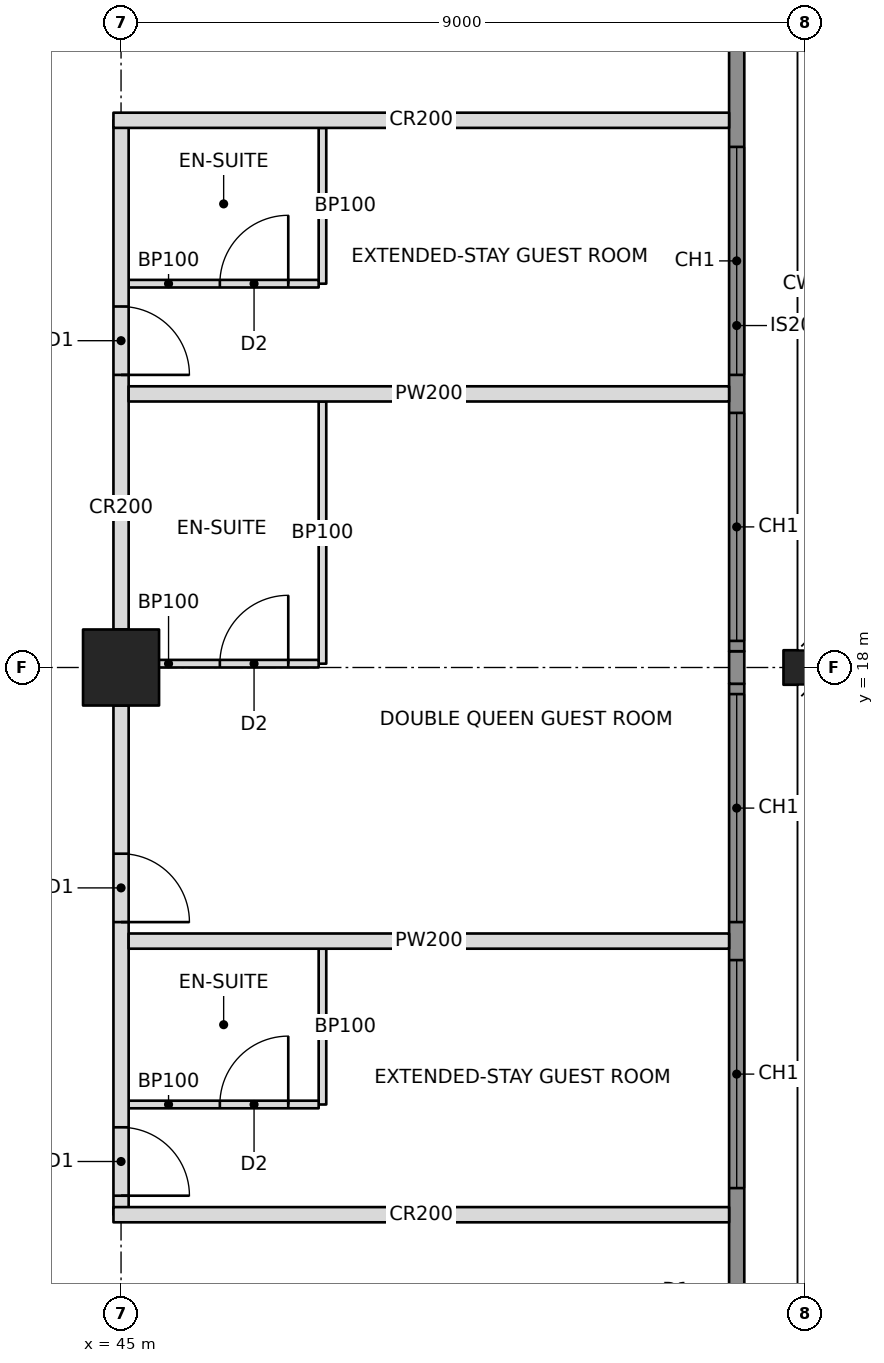
"""IFC4 building model, lengths in metres.
Left out: names, types, materials, properties, quantities, classifications, styles, units other than length and angle.
Written with IfcOpenShell. Run it as: python <this file> out.ifc"""

import sys

from ifc_helpers import new_model, si_unit, direction, frame, frame_2d, origin, origin_2d, place, context, subcontext, project, spatial, rectangle, hollow_rectangle, i_section, extrude, element, fill, save


model = new_model("IFC4")
c1 = context("Model", 3, precision=1e-05, world=origin(), true_north=direction((0.0, 1.0)))
c2 = subcontext(c1, "Body", "Model", "MODEL_VIEW")
j1 = project(units=[si_unit("LENGTHUNIT", "METRE"), si_unit("PLANEANGLEUNIT", "RADIAN")], contexts=[c1])
p1 = place(None, origin())
s1 = spatial("IfcSite", under=j1, at=p1, CompositionType="ELEMENT")
p2 = place(p1, origin())
s2 = spatial("IfcBuilding", under=s1, at=p2, CompositionType="ELEMENT")
p3 = place(p2, frame((0.0, 0.0, 85.8)))
s3 = spatial("IfcBuildingStorey", under=s2, at=p3, CompositionType="ELEMENT", Elevation=85.8)
p4 = place(p3, frame((45.0, 18.0, 0.0), z_axis=(0.0, 0.0, 1.0), x_axis=(0.0, 1.0, 0.0)))
e1 = element("IfcColumn", 1, at=p4, inside=s3, PredefinedType="COLUMN", context=c2, shape_type="SweptSolid", body=[
    extrude(hollow_rectangle(XDim=1.0, YDim=1.0, WallThickness=0.1, at=origin_2d()), origin(), (0.0, 0.0, 1.0), 3.4),
])
p5 = place(p3, frame((54.0, 18.0, 0.0), z_axis=(0.0, 0.0, 1.0), x_axis=(0.0, 1.0, 0.0)))
e2 = element("IfcColumn", 2, at=p5, inside=s3, PredefinedType="COLUMN", context=c2, shape_type="SweptSolid", body=[
    extrude(i_section(OverallWidth=0.455, OverallDepth=0.569, WebThickness=0.078, FlangeThickness=0.125, at=origin_2d()), origin(), (0.0, 0.0, 1.0), 3.4),
])
p6 = place(p3, frame((45.0, 10.8, 0.0), z_axis=(0.0, 0.0, 1.0), x_axis=(0.0, 1.0, 0.0)))
e3 = element("IfcWall", 3, at=p6, inside=s3, PredefinedType="PARTITIONING", context=c2, shape_type="SweptSolid", body=[
    extrude(rectangle(XDim=6.7, YDim=0.2, at=frame_2d((3.35, 0.0))), origin(), (0.0, 0.0, 1.0), 2.21),
])
p7 = place(p6, frame((0.25, 0.0, 0.0)))
e4 = element("IfcOpeningElement", 4, at=p7, cuts=e3, PredefinedType="OPENING", context=c2, shape_type="SweptSolid", body=[
    extrude(rectangle(XDim=0.9, YDim=2.1, at=frame_2d((0.45, 1.05))), frame((0.0, 0.11, 0.0), z_axis=(0.0, -1.0, 0.0), x_axis=(1.0, 0.0, 0.0)), (0.0, 0.0, 1.0), 0.22),
])
p8 = place(p6, frame((3.85, 0.0, 0.0)))
e5 = element("IfcOpeningElement", 5, at=p8, cuts=e3, PredefinedType="OPENING", context=c2, shape_type="SweptSolid", body=[
    extrude(rectangle(XDim=0.9, YDim=2.1, at=frame_2d((0.45, 1.05))), frame((0.0, 0.11, 0.0), z_axis=(0.0, -1.0, 0.0), x_axis=(1.0, 0.0, 0.0)), (0.0, 0.0, 1.0), 0.22),
])
p9 = place(p3, frame((45.0, 18.5, 0.0), z_axis=(0.0, 0.0, 1.0), x_axis=(0.0, 1.0, 0.0)))
e6 = element("IfcWall", 6, at=p9, inside=s3, PredefinedType="PARTITIONING", context=c2, shape_type="SweptSolid", body=[
    extrude(rectangle(XDim=6.7, YDim=0.2, at=frame_2d((3.35, 0.0))), origin(), (0.0, 0.0, 1.0), 2.21),
])
p10 = place(p9, frame((3.35, 0.0, 0.0)))
e7 = element("IfcOpeningElement", 7, at=p10, cuts=e6, PredefinedType="OPENING", context=c2, shape_type="SweptSolid", body=[
    extrude(rectangle(XDim=0.9, YDim=2.1, at=frame_2d((0.45, 1.05))), frame((0.0, 0.11, 0.0), z_axis=(0.0, -1.0, 0.0), x_axis=(1.0, 0.0, 0.0)), (0.0, 0.0, 1.0), 0.22),
])
for number, where, z_axis, x_axis in (
    (8, (44.9, 10.8, 0.0), (0.0, 0.0, 1.0), (1.0, 0.0, 0.0)),
    (9, (44.9, 25.2, 0.0), (0.0, 0.0, 1.0), (1.0, 0.0, 0.0)),
):
    element("IfcWall", number, at=place(p3, frame(where, z_axis=z_axis, x_axis=x_axis)), inside=s3, PredefinedType="PARTITIONING", context=c2, shape_type="SweptSolid", body=[
        extrude(rectangle(XDim=8.1, YDim=0.2, at=frame_2d((4.05, 0.0))), origin(), (0.0, 0.0, 1.0), 2.21),
    ])
for number, where, z_axis, x_axis in (
    (10, (45.1, 14.4, 0.0), (0.0, 0.0, 1.0), (1.0, 0.0, 0.0)),
    (11, (45.1, 21.6, 0.0), (0.0, 0.0, 1.0), (1.0, 0.0, 0.0)),
):
    element("IfcWall", number, at=place(p3, frame(where, z_axis=z_axis, x_axis=x_axis)), inside=s3, PredefinedType="PARTITIONING", context=c2, shape_type="SweptSolid", body=[
        extrude(rectangle(XDim=7.9, YDim=0.2, at=frame_2d((3.95, 0.0))), origin(), (0.0, 0.0, 1.0), 2.21),
    ])
p11 = place(p3, frame((47.65, 12.25, 0.0), z_axis=(0.0, 0.0, 1.0), x_axis=(0.0, 1.0, 0.0)))
e12 = element("IfcWall", 12, at=p11, inside=s3, PredefinedType="PARTITIONING", context=c2, shape_type="SweptSolid", body=[
    extrude(rectangle(XDim=2.05, YDim=0.1, at=frame_2d((1.025, 0.0))), origin(), (0.0, 0.0, 1.0), 3.15),
])
p12 = place(p3, frame((45.1, 12.25, 0.0), z_axis=(0.0, 0.0, 1.0), x_axis=(1.0, 0.0, 0.0)))
e13 = element("IfcWall", 13, at=p12, inside=s3, PredefinedType="PARTITIONING", context=c2, shape_type="SweptSolid", body=[
    extrude(rectangle(XDim=2.5, YDim=0.1, at=frame_2d((1.25, 0.0))), origin(), (0.0, 0.0, 1.0), 2.21),
])
p13 = place(p12, frame((1.2, 0.0, 0.0)))
e14 = element("IfcOpeningElement", 14, at=p13, cuts=e13, PredefinedType="OPENING", context=c2, shape_type="SweptSolid", body=[
    extrude(rectangle(XDim=0.9, YDim=2.1, at=frame_2d((0.45, 1.05))), frame((0.0, 0.06, 0.0), z_axis=(0.0, -1.0, 0.0), x_axis=(1.0, 0.0, 0.0)), (0.0, 0.0, 1.0), 0.12),
])
p14 = place(p3, frame((47.65, 18.05, 0.0), z_axis=(0.0, 0.0, 1.0), x_axis=(0.0, 1.0, 0.0)))
e15 = element("IfcWall", 15, at=p14, inside=s3, PredefinedType="PARTITIONING", context=c2, shape_type="SweptSolid", body=[
    extrude(rectangle(XDim=3.45, YDim=0.1, at=frame_2d((1.725, 0.0))), origin(), (0.0, 0.0, 1.0), 2.202),
])
p15 = place(p3, frame((45.1, 18.05, 0.0), z_axis=(0.0, 0.0, 1.0), x_axis=(1.0, 0.0, 0.0)))
e16 = element("IfcWall", 16, at=p15, inside=s3, PredefinedType="PARTITIONING", context=c2, shape_type="SweptSolid", body=[
    extrude(rectangle(XDim=2.5, YDim=0.1, at=frame_2d((1.25, 0.0))), origin(), (0.0, 0.0, 1.0), 2.203),
])
p16 = place(p15, frame((1.2, 0.0, 0.0)))
e17 = element("IfcOpeningElement", 17, at=p16, cuts=e16, PredefinedType="OPENING", context=c2, shape_type="SweptSolid", body=[
    extrude(rectangle(XDim=0.9, YDim=2.1, at=frame_2d((0.45, 1.05))), frame((0.0, 0.06, 0.0), z_axis=(0.0, -1.0, 0.0), x_axis=(1.0, 0.0, 0.0)), (0.0, 0.0, 1.0), 0.12),
])
p17 = place(p3, frame((47.65, 23.05, 0.0), z_axis=(0.0, 0.0, 1.0), x_axis=(0.0, 1.0, 0.0)))
e18 = element("IfcWall", 18, at=p17, inside=s3, PredefinedType="PARTITIONING", context=c2, shape_type="SweptSolid", body=[
    extrude(rectangle(XDim=2.05, YDim=0.1, at=frame_2d((1.025, 0.0))), origin(), (0.0, 0.0, 1.0), 3.15),
])
p18 = place(p3, frame((45.1, 23.05, 0.0), z_axis=(0.0, 0.0, 1.0), x_axis=(1.0, 0.0, 0.0)))
e19 = element("IfcWall", 19, at=p18, inside=s3, PredefinedType="PARTITIONING", context=c2, shape_type="SweptSolid", body=[
    extrude(rectangle(XDim=2.5, YDim=0.1, at=frame_2d((1.25, 0.0))), origin(), (0.0, 0.0, 1.0), 2.21),
])
p19 = place(p18, frame((1.2, 0.0, 0.0)))
e20 = element("IfcOpeningElement", 20, at=p19, cuts=e19, PredefinedType="OPENING", context=c2, shape_type="SweptSolid", body=[
    extrude(rectangle(XDim=0.9, YDim=2.1, at=frame_2d((0.45, 1.05))), frame((0.0, 0.06, 0.0), z_axis=(0.0, -1.0, 0.0), x_axis=(1.0, 0.0, 0.0)), (0.0, 0.0, 1.0), 0.12),
])
p20 = place(p3, frame((53.1, 9.215, 0.0), z_axis=(0.0, 0.0, 1.0), x_axis=(0.0, 1.0, 0.0)))
e21 = element("IfcWall", 21, at=p20, inside=s3, PredefinedType="SOLIDWALL", context=c2, shape_type="SweptSolid", body=[
    extrude(rectangle(XDim=8.571, YDim=0.2, at=frame_2d((4.285, 0.0))), origin(), (0.0, 0.0, 1.0), 3.15),
])
p21 = place(p20, frame((1.935, 0.0, 0.6)))
e22 = element("IfcOpeningElement", 22, at=p21, cuts=e21, PredefinedType="OPENING", context=c2, shape_type="SweptSolid", body=[
    extrude(rectangle(XDim=3.0, YDim=2.2, at=frame_2d((1.5, 1.1))), frame((0.0, 0.11, 0.0), z_axis=(0.0, -1.0, 0.0), x_axis=(1.0, 0.0, 0.0)), (0.0, 0.0, 1.0), 0.22),
])
p22 = place(p20, frame((5.435, 0.0, 0.6)))
e23 = element("IfcOpeningElement", 23, at=p22, cuts=e21, PredefinedType="OPENING", context=c2, shape_type="SweptSolid", body=[
    extrude(rectangle(XDim=3.0, YDim=2.2, at=frame_2d((1.5, 1.1))), frame((0.0, 0.11, 0.0), z_axis=(0.0, -1.0, 0.0), x_axis=(1.0, 0.0, 0.0)), (0.0, 0.0, 1.0), 0.22),
])
p23 = place(p3, frame((53.1, 17.786, 0.0), z_axis=(0.0, 0.0, 1.0), x_axis=(0.0, 1.0, 0.0)))
e24 = element("IfcWall", 24, at=p23, inside=s3, PredefinedType="SOLIDWALL", context=c2, shape_type="SweptSolid", body=[
    extrude(rectangle(XDim=0.428, YDim=0.2, at=frame_2d((0.214, 0.0))), origin(), (0.0, 0.0, 1.0), 2.202),
])
p24 = place(p3, frame((53.1, 18.214, 0.0), z_axis=(0.0, 0.0, 1.0), x_axis=(0.0, 1.0, 0.0)))
e25 = element("IfcWall", 25, at=p24, inside=s3, PredefinedType="SOLIDWALL", context=c2, shape_type="SweptSolid", body=[
    extrude(rectangle(XDim=8.571, YDim=0.2, at=frame_2d((4.285, 0.0))), origin(), (0.0, 0.0, 1.0), 3.15),
])
p25 = place(p24, frame((0.136, 0.0, 0.6)))
e26 = element("IfcOpeningElement", 26, at=p25, cuts=e25, PredefinedType="OPENING", context=c2, shape_type="SweptSolid", body=[
    extrude(rectangle(XDim=3.0, YDim=2.2, at=frame_2d((1.5, 1.1))), frame((0.0, 0.11, 0.0), z_axis=(0.0, -1.0, 0.0), x_axis=(1.0, 0.0, 0.0)), (0.0, 0.0, 1.0), 0.22),
])
p26 = place(p24, frame((3.636, 0.0, 0.6)))
e27 = element("IfcOpeningElement", 27, at=p26, cuts=e25, PredefinedType="OPENING", context=c2, shape_type="SweptSolid", body=[
    extrude(rectangle(XDim=3.0, YDim=2.2, at=frame_2d((1.5, 1.1))), frame((0.0, 0.11, 0.0), z_axis=(0.0, -1.0, 0.0), x_axis=(1.0, 0.0, 0.0)), (0.0, 0.0, 1.0), 0.22),
])
p27 = place(p21, origin())
e28 = element("IfcWindow", 28, at=p27, inside=s3, PartitioningType="TRIPLE_PANEL_VERTICAL", PredefinedType="WINDOW", context=c2, shape_type="SweptSolid", body=[
    extrude(rectangle(XDim=3.0, YDim=2.2, at=frame_2d((1.5, 1.1))), frame((0.0, 0.03, 0.0), z_axis=(0.0, -1.0, 0.0), x_axis=(1.0, 0.0, 0.0)), (0.0, 0.0, 1.0), 0.06),
])
fill(e22, e28)
p28 = place(p22, origin())
e29 = element("IfcWindow", 29, at=p28, inside=s3, PartitioningType="TRIPLE_PANEL_VERTICAL", PredefinedType="WINDOW", context=c2, shape_type="SweptSolid", body=[
    extrude(rectangle(XDim=3.0, YDim=2.2, at=frame_2d((1.5, 1.1))), frame((0.0, 0.03, 0.0), z_axis=(0.0, -1.0, 0.0), x_axis=(1.0, 0.0, 0.0)), (0.0, 0.0, 1.0), 0.06),
])
fill(e23, e29)
p29 = place(p25, origin())
e30 = element("IfcWindow", 30, at=p29, inside=s3, PartitioningType="TRIPLE_PANEL_VERTICAL", PredefinedType="WINDOW", context=c2, shape_type="SweptSolid", body=[
    extrude(rectangle(XDim=3.0, YDim=2.2, at=frame_2d((1.5, 1.1))), frame((0.0, 0.03, 0.0), z_axis=(0.0, -1.0, 0.0), x_axis=(1.0, 0.0, 0.0)), (0.0, 0.0, 1.0), 0.06),
])
fill(e26, e30)
p30 = place(p26, origin())
e31 = element("IfcWindow", 31, at=p30, inside=s3, PartitioningType="TRIPLE_PANEL_VERTICAL", PredefinedType="WINDOW", context=c2, shape_type="SweptSolid", body=[
    extrude(rectangle(XDim=3.0, YDim=2.2, at=frame_2d((1.5, 1.1))), frame((0.0, 0.03, 0.0), z_axis=(0.0, -1.0, 0.0), x_axis=(1.0, 0.0, 0.0)), (0.0, 0.0, 1.0), 0.06),
])
fill(e27, e31)
p31 = place(p13, origin())
e32 = element("IfcDoor", 32, at=p31, inside=s3, OperationType="SINGLE_SWING_RIGHT", PredefinedType="DOOR", context=c2, shape_type="SweptSolid", body=[
    extrude(rectangle(XDim=0.9, YDim=2.1, at=frame_2d((0.45, 1.05))), frame((0.0, 0.025, 0.0), z_axis=(0.0, -1.0, 0.0), x_axis=(1.0, 0.0, 0.0)), (0.0, 0.0, 1.0), 0.05),
])
fill(e14, e32)
p32 = place(p7, frame((0.9, 0.0, 0.0), z_axis=(0.0, 0.0, 1.0), x_axis=(-1.0, 0.0, 0.0)))
e33 = element("IfcDoor", 33, at=p32, inside=s3, OperationType="SINGLE_SWING_RIGHT", PredefinedType="DOOR", context=c2, shape_type="SweptSolid", body=[
    extrude(rectangle(XDim=0.9, YDim=2.1, at=frame_2d((0.45, 1.05))), frame((0.0, 0.025, 0.0), z_axis=(0.0, -1.0, 0.0), x_axis=(1.0, 0.0, 0.0)), (0.0, 0.0, 1.0), 0.05),
])
fill(e4, e33)
p33 = place(p16, origin())
e34 = element("IfcDoor", 34, at=p33, inside=s3, OperationType="SINGLE_SWING_RIGHT", PredefinedType="DOOR", context=c2, shape_type="SweptSolid", body=[
    extrude(rectangle(XDim=0.9, YDim=2.1, at=frame_2d((0.45, 1.05))), frame((0.0, 0.025, 0.0), z_axis=(0.0, -1.0, 0.0), x_axis=(1.0, 0.0, 0.0)), (0.0, 0.0, 1.0), 0.05),
])
fill(e17, e34)
p34 = place(p8, frame((0.9, 0.0, 0.0), z_axis=(0.0, 0.0, 1.0), x_axis=(-1.0, 0.0, 0.0)))
e35 = element("IfcDoor", 35, at=p34, inside=s3, OperationType="SINGLE_SWING_RIGHT", PredefinedType="DOOR", context=c2, shape_type="SweptSolid", body=[
    extrude(rectangle(XDim=0.9, YDim=2.1, at=frame_2d((0.45, 1.05))), frame((0.0, 0.025, 0.0), z_axis=(0.0, -1.0, 0.0), x_axis=(1.0, 0.0, 0.0)), (0.0, 0.0, 1.0), 0.05),
])
fill(e5, e35)
p35 = place(p19, origin())
e36 = element("IfcDoor", 36, at=p35, inside=s3, OperationType="SINGLE_SWING_RIGHT", PredefinedType="DOOR", context=c2, shape_type="SweptSolid", body=[
    extrude(rectangle(XDim=0.9, YDim=2.1, at=frame_2d((0.45, 1.05))), frame((0.0, 0.025, 0.0), z_axis=(0.0, -1.0, 0.0), x_axis=(1.0, 0.0, 0.0)), (0.0, 0.0, 1.0), 0.05),
])
fill(e20, e36)
p36 = place(p10, frame((0.9, 0.0, 0.0), z_axis=(0.0, 0.0, 1.0), x_axis=(-1.0, 0.0, 0.0)))
e37 = element("IfcDoor", 37, at=p36, inside=s3, OperationType="SINGLE_SWING_RIGHT", PredefinedType="DOOR", context=c2, shape_type="SweptSolid", body=[
    extrude(rectangle(XDim=0.9, YDim=2.1, at=frame_2d((0.45, 1.05))), frame((0.0, 0.025, 0.0), z_axis=(0.0, -1.0, 0.0), x_axis=(1.0, 0.0, 0.0)), (0.0, 0.0, 1.0), 0.05),
])
fill(e7, e37)
save(model, sys.argv[1])
